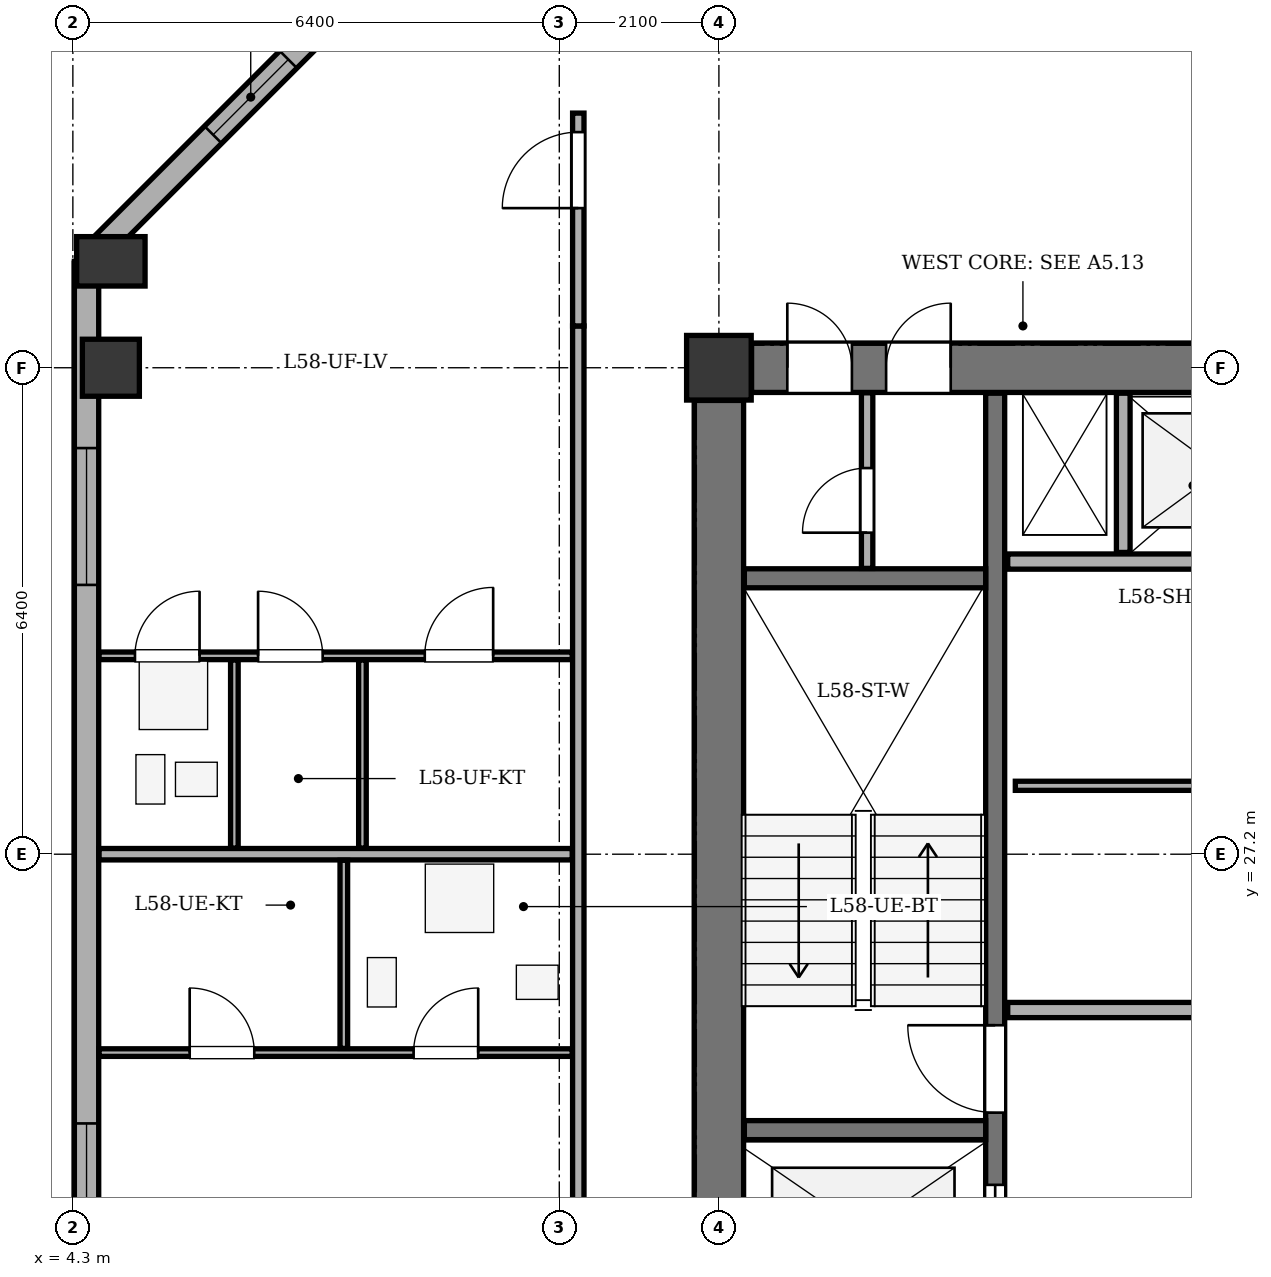
"""IFC4 building model, lengths in metres.
Left out: names, types, materials, properties, quantities, classifications, styles, units other than length and angle.
Written with IfcOpenShell. Run it as: python <this file> out.ifc"""

import sys

from ifc_helpers import new_model, si_unit, direction, frame, frame_2d, origin, origin_2d, place, context, subcontext, project, spatial, rectangle, extrude, element, fill, save


model = new_model("IFC4")
c1 = context("Model", 3, precision=1e-05, world=origin(), true_north=direction((0.0, 1.0)))
c2 = subcontext(c1, "Body", "Model", "MODEL_VIEW")
j1 = project(units=[si_unit("LENGTHUNIT", "METRE"), si_unit("PLANEANGLEUNIT", "RADIAN")], contexts=[c1])
p1 = place(None, origin())
s1 = spatial("IfcSite", under=j1, at=p1, CompositionType="ELEMENT")
p2 = place(p1, origin())
s2 = spatial("IfcBuilding", under=s1, at=p2, CompositionType="ELEMENT")
p3 = place(p2, frame((0.0, 0.0, 224.5)))
s3 = spatial("IfcBuildingStorey", under=s2, at=p3, CompositionType="ELEMENT", Elevation=224.5)
p4 = place(p3, frame((12.8, 33.6, 0.0), z_axis=(0.0, 0.0, 1.0), x_axis=(1.0, 0.0, 0.0)))
e1 = element("IfcColumn", 1, at=p4, inside=s3, PredefinedType="COLUMN", context=c2, shape_type="SweptSolid", body=[
    extrude(rectangle(XDim=0.85, YDim=0.85, at=origin_2d()), origin(), (0.0, 0.0, 1.0), 3.4),
])
p5 = place(p3, frame((4.8, 33.6, 0.0), z_axis=(0.0, 0.0, 1.0), x_axis=(1.0, 0.0, 0.0)))
e2 = element("IfcColumn", 2, at=p5, inside=s3, PredefinedType="COLUMN", context=c2, shape_type="SweptSolid", body=[
    extrude(rectangle(XDim=0.75, YDim=0.75, at=origin_2d()), origin(), (0.0, 0.0, 1.0), 3.4),
])
p6 = place(p3, frame((4.8, 35.0, 0.0), z_axis=(0.0, 0.0, 1.0), x_axis=(1.0, 0.0, 0.0)))
e3 = element("IfcColumn", 3, at=p6, inside=s3, PredefinedType="COLUMN", context=c2, shape_type="SweptSolid", body=[
    extrude(rectangle(XDim=0.65, YDim=0.9, at=origin_2d()), origin(), (0.0, 0.0, 1.0), 3.4),
])
p7 = place(p3, frame((4.48, 7.2, 0.0), z_axis=(0.0, 0.0, 1.0), x_axis=(0.0, 1.0, 0.0)))
e4 = element("IfcWall", 4, at=p7, inside=s3, PredefinedType="STANDARD", context=c2, shape_type="SweptSolid", body=[
    extrude(rectangle(XDim=27.8, YDim=0.32, at=frame_2d((13.9, 0.0))), origin(), (0.0, 0.0, 1.0), 2.335),
])
p8 = place(p7, frame((1.272, 0.0, 0.75)))
e5 = element("IfcOpeningElement", 5, at=p8, cuts=e4, PredefinedType="OPENING", context=c2, shape_type="SweptSolid", body=[
    extrude(rectangle(XDim=1.8, YDim=1.465, at=frame_2d((0.9, 0.732))), frame((0.0, 0.17, 0.0), z_axis=(0.0, -1.0, 0.0), x_axis=(1.0, 0.0, 0.0)), (0.0, 0.0, 1.0), 0.34),
])
p9 = place(p7, frame((3.806, 0.0, 0.75)))
e6 = element("IfcOpeningElement", 6, at=p9, cuts=e4, PredefinedType="OPENING", context=c2, shape_type="SweptSolid", body=[
    extrude(rectangle(XDim=1.8, YDim=1.465, at=frame_2d((0.9, 0.732))), frame((0.0, 0.17, 0.0), z_axis=(0.0, -1.0, 0.0), x_axis=(1.0, 0.0, 0.0)), (0.0, 0.0, 1.0), 0.34),
])
p10 = place(p7, frame((7.711, 0.0, 0.75)))
e7 = element("IfcOpeningElement", 7, at=p10, cuts=e4, PredefinedType="OPENING", context=c2, shape_type="SweptSolid", body=[
    extrude(rectangle(XDim=1.8, YDim=1.465, at=frame_2d((0.9, 0.732))), frame((0.0, 0.17, 0.0), z_axis=(0.0, -1.0, 0.0), x_axis=(1.0, 0.0, 0.0)), (0.0, 0.0, 1.0), 0.34),
])
p11 = place(p7, frame((10.542, 0.0, 0.75)))
e8 = element("IfcOpeningElement", 8, at=p11, cuts=e4, PredefinedType="OPENING", context=c2, shape_type="SweptSolid", body=[
    extrude(rectangle(XDim=1.8, YDim=1.465, at=frame_2d((0.9, 0.732))), frame((0.0, 0.17, 0.0), z_axis=(0.0, -1.0, 0.0), x_axis=(1.0, 0.0, 0.0)), (0.0, 0.0, 1.0), 0.34),
])
p12 = place(p7, frame((14.658, 0.0, 0.75)))
e9 = element("IfcOpeningElement", 9, at=p12, cuts=e4, PredefinedType="OPENING", context=c2, shape_type="SweptSolid", body=[
    extrude(rectangle(XDim=1.8, YDim=1.465, at=frame_2d((0.9, 0.732))), frame((0.0, 0.17, 0.0), z_axis=(0.0, -1.0, 0.0), x_axis=(1.0, 0.0, 0.0)), (0.0, 0.0, 1.0), 0.34),
])
p13 = place(p7, frame((23.543, 0.0, 0.75)))
e10 = element("IfcOpeningElement", 10, at=p13, cuts=e4, PredefinedType="OPENING", context=c2, shape_type="SweptSolid", body=[
    extrude(rectangle(XDim=1.8, YDim=1.465, at=frame_2d((0.9, 0.732))), frame((0.0, 0.17, 0.0), z_axis=(0.0, -1.0, 0.0), x_axis=(1.0, 0.0, 0.0)), (0.0, 0.0, 1.0), 0.34),
])
p14 = place(p3, frame((4.48, 35.0, 0.0), z_axis=(0.0, 0.0, 1.0), x_axis=(0.707106781187, 0.707106781187, 0.0)))
e11 = element("IfcWall", 11, at=p14, inside=s3, PredefinedType="STANDARD", context=c2, shape_type="SweptSolid", body=[
    extrude(rectangle(XDim=6.11, YDim=0.32, at=frame_2d((3.055, 0.0))), origin(), (0.0, 0.0, 1.0), 2.335),
])
p15 = place(p14, frame((2.355, 0.0, 0.75)))
e12 = element("IfcOpeningElement", 12, at=p15, cuts=e11, PredefinedType="OPENING", context=c2, shape_type="SweptSolid", body=[
    extrude(rectangle(XDim=1.4, YDim=1.465, at=frame_2d((0.7, 0.732))), frame((0.0, 0.17, 0.0), z_axis=(0.0, -1.0, 0.0), x_axis=(1.0, 0.0, 0.0)), (0.0, 0.0, 1.0), 0.34),
])
p16 = place(p3, frame((12.8, 21.23, 0.0), z_axis=(0.0, 0.0, 1.0), x_axis=(0.0, 1.0, 0.0)))
e13 = element("IfcWall", 13, at=p16, inside=s3, PredefinedType="SHEAR", context=c2, shape_type="SweptSolid", body=[
    extrude(rectangle(XDim=11.94, YDim=0.65, at=frame_2d((5.97, 0.0))), origin(), (0.0, 0.0, 1.0), 2.95),
])
p17 = place(p3, frame((13.23, 33.6, 0.0), z_axis=(0.0, 0.0, 1.0), x_axis=(1.0, 0.0, 0.0)))
e14 = element("IfcWall", 14, at=p17, inside=s3, PredefinedType="SHEAR", context=c2, shape_type="SweptSolid", body=[
    extrude(rectangle(XDim=7.14, YDim=0.65, at=frame_2d((3.57, 0.0))), origin(), (0.0, 0.0, 1.0), 2.95),
])
p18 = place(p17, frame((0.47, 0.0, 0.0)))
e15 = element("IfcOpeningElement", 15, at=p18, cuts=e14, PredefinedType="OPENING", context=c2, shape_type="SweptSolid", body=[
    extrude(rectangle(XDim=0.85, YDim=2.02, at=frame_2d((0.425, 1.01))), frame((0.0, 0.335, 0.0), z_axis=(0.0, -1.0, 0.0), x_axis=(1.0, 0.0, 0.0)), (0.0, 0.0, 1.0), 0.67),
])
p19 = place(p17, frame((1.77, 0.0, 0.0)))
e16 = element("IfcOpeningElement", 16, at=p19, cuts=e14, PredefinedType="OPENING", context=c2, shape_type="SweptSolid", body=[
    extrude(rectangle(XDim=0.85, YDim=2.02, at=frame_2d((0.425, 1.01))), frame((0.0, 0.335, 0.0), z_axis=(0.0, -1.0, 0.0), x_axis=(1.0, 0.0, 0.0)), (0.0, 0.0, 1.0), 0.67),
])
p20 = place(p3, frame((16.435, 21.135, 0.0), z_axis=(0.0, 0.0, 1.0), x_axis=(0.0, 1.0, 0.0)))
e17 = element("IfcWall", 17, at=p20, inside=s3, PredefinedType="SHEAR", context=c2, shape_type="SweptSolid", body=[
    extrude(rectangle(XDim=12.13, YDim=0.25, at=frame_2d((6.065, 0.0))), origin(), (0.0, 0.0, 1.0), 2.95),
])
p21 = place(p20, frame((0.515, 0.0, 0.0)))
e18 = element("IfcOpeningElement", 18, at=p21, cuts=e17, PredefinedType="OPENING", context=c2, shape_type="SweptSolid", body=[
    extrude(rectangle(XDim=1.2, YDim=2.15, at=frame_2d((0.6, 1.075))), frame((0.0, 0.135, 0.0), z_axis=(0.0, -1.0, 0.0), x_axis=(1.0, 0.0, 0.0)), (0.0, 0.0, 1.0), 0.27),
])
p22 = place(p20, frame((2.665, 0.0, 0.0)))
e19 = element("IfcOpeningElement", 19, at=p22, cuts=e17, PredefinedType="OPENING", context=c2, shape_type="SweptSolid", body=[
    extrude(rectangle(XDim=1.15, YDim=2.15, at=frame_2d((0.575, 1.075))), frame((0.0, 0.135, 0.0), z_axis=(0.0, -1.0, 0.0), x_axis=(1.0, 0.0, 0.0)), (0.0, 0.0, 1.0), 0.27),
])
for number, where, z_axis, x_axis in (
    (20, (13.135, 23.57, 0.0), (0.0, 0.0, 1.0), (1.0, 0.0, 0.0)),
    (21, (13.135, 30.83, 0.0), (0.0, 0.0, 1.0), (1.0, 0.0, 0.0)),
):
    element("IfcWall", number, at=place(p3, frame(where, z_axis=z_axis, x_axis=x_axis)), inside=s3, PredefinedType="SHEAR", context=c2, shape_type="SweptSolid", body=[
        extrude(rectangle(XDim=3.175, YDim=0.25, at=frame_2d((1.587, 0.0))), origin(), (0.0, 0.0, 1.0), 2.95),
    ])
for number, where, z_axis, x_axis in (
    (22, (16.6, 25.15, 0.0), (0.0, 0.0, 1.0), (1.0, 0.0, 0.0)),
    (23, (16.6, 31.05, 0.0), (0.0, 0.0, 1.0), (1.0, 0.0, 0.0)),
):
    element("IfcWall", number, at=place(p3, frame(where, z_axis=z_axis, x_axis=x_axis)), inside=s3, PredefinedType="SOLIDWALL", context=c2, shape_type="SweptSolid", body=[
        extrude(rectangle(XDim=3.85, YDim=0.2, at=frame_2d((1.925, 0.0))), origin(), (0.0, 0.0, 1.0), 2.95),
    ])
p23 = place(p3, frame((18.12, 31.17, 0.0), z_axis=(0.0, 0.0, 1.0), x_axis=(0.0, 1.0, 0.0)))
e24 = element("IfcWall", 24, at=p23, inside=s3, PredefinedType="PARTITIONING", context=c2, shape_type="SweptSolid", body=[
    extrude(rectangle(XDim=2.095, YDim=0.18, at=frame_2d((1.047, 0.0))), origin(), (0.0, 0.0, 1.0), 2.95),
])
p24 = place(p3, frame((14.75, 30.96, 0.0), z_axis=(0.0, 0.0, 1.0), x_axis=(0.0, 1.0, 0.0)))
e25 = element("IfcWall", 25, at=p24, inside=s3, PredefinedType="PARTITIONING", context=c2, shape_type="SweptSolid", body=[
    extrude(rectangle(XDim=2.31, YDim=0.15, at=frame_2d((1.155, 0.0))), origin(), (0.0, 0.0, 1.0), 2.95),
])
p25 = place(p24, frame((0.47, 0.0, 0.0)))
e26 = element("IfcOpeningElement", 26, at=p25, cuts=e25, PredefinedType="OPENING", context=c2, shape_type="SweptSolid", body=[
    extrude(rectangle(XDim=0.85, YDim=2.02, at=frame_2d((0.425, 1.01))), frame((0.0, 0.085, 0.0), z_axis=(0.0, -1.0, 0.0), x_axis=(1.0, 0.0, 0.0)), (0.0, 0.0, 1.0), 0.17),
])
p26 = place(p3, frame((16.7, 28.1, 0.0), z_axis=(0.0, 0.0, 1.0), x_axis=(1.0, 0.0, 0.0)))
e27 = element("IfcWall", 27, at=p26, inside=s3, PredefinedType="PARTITIONING", context=c2, shape_type="SweptSolid", body=[
    extrude(rectangle(XDim=9.85, YDim=0.12, at=frame_2d((4.925, 0.0))), origin(), (0.0, 0.0, 1.0), 2.95),
])
p27 = place(p3, frame((10.95, 20.25, 0.0), z_axis=(0.0, 0.0, 1.0), x_axis=(0.0, 1.0, 0.0)))
e28 = element("IfcWall", 28, at=p27, inside=s3, PredefinedType="PARTITIONING", context=c2, shape_type="SweptSolid", body=[
    extrude(rectangle(XDim=13.9, YDim=0.15, at=frame_2d((6.95, 0.0))), origin(), (0.0, 0.0, 1.0), 2.335),
])
p28 = place(p3, frame((10.95, 34.15, 0.0), z_axis=(0.0, 0.0, 1.0), x_axis=(0.0, 1.0, 0.0)))
e29 = element("IfcWall", 29, at=p28, inside=s3, PredefinedType="PARTITIONING", context=c2, shape_type="SweptSolid", body=[
    extrude(rectangle(XDim=2.8, YDim=0.15, at=frame_2d((1.4, 0.0))), origin(), (0.0, 0.0, 1.0), 2.335),
])
p29 = place(p28, frame((1.55, 0.0, 0.0)))
e30 = element("IfcOpeningElement", 30, at=p29, cuts=e29, PredefinedType="OPENING", context=c2, shape_type="SweptSolid", body=[
    extrude(rectangle(XDim=1.0, YDim=2.1, at=frame_2d((0.5, 1.05))), frame((0.0, 0.085, 0.0), z_axis=(0.0, -1.0, 0.0), x_axis=(1.0, 0.0, 0.0)), (0.0, 0.0, 1.0), 0.17),
])
p30 = place(p3, frame((4.645, 27.2, 0.0), z_axis=(0.0, 0.0, 1.0), x_axis=(1.0, 0.0, 0.0)))
e31 = element("IfcWall", 31, at=p30, inside=s3, PredefinedType="PARTITIONING", context=c2, shape_type="SweptSolid", body=[
    extrude(rectangle(XDim=6.225, YDim=0.15, at=frame_2d((3.113, 0.0))), origin(), (0.0, 0.0, 1.0), 2.95),
])
p31 = place(p3, frame((4.645, 24.59, 0.0), z_axis=(0.0, 0.0, 1.0), x_axis=(1.0, 0.0, 0.0)))
e32 = element("IfcWall", 32, at=p31, inside=s3, PredefinedType="PARTITIONING", context=c2, shape_type="SweptSolid", body=[
    extrude(rectangle(XDim=6.225, YDim=0.1, at=frame_2d((3.113, 0.0))), origin(), (0.0, 0.0, 1.0), 2.95),
])
p32 = place(p31, frame((1.192, 0.0, 0.0)))
e33 = element("IfcOpeningElement", 33, at=p32, cuts=e32, PredefinedType="OPENING", context=c2, shape_type="SweptSolid", body=[
    extrude(rectangle(XDim=0.85, YDim=2.05, at=frame_2d((0.425, 1.025))), frame((0.0, 0.06, 0.0), z_axis=(0.0, -1.0, 0.0), x_axis=(1.0, 0.0, 0.0)), (0.0, 0.0, 1.0), 0.12),
])
p33 = place(p31, frame((4.138, 0.0, 0.0)))
e34 = element("IfcOpeningElement", 34, at=p33, cuts=e32, PredefinedType="OPENING", context=c2, shape_type="SweptSolid", body=[
    extrude(rectangle(XDim=0.85, YDim=2.05, at=frame_2d((0.425, 1.025))), frame((0.0, 0.06, 0.0), z_axis=(0.0, -1.0, 0.0), x_axis=(1.0, 0.0, 0.0)), (0.0, 0.0, 1.0), 0.12),
])
p34 = place(p3, frame((7.865, 24.645, 0.0), z_axis=(0.0, 0.0, 1.0), x_axis=(0.0, 1.0, 0.0)))
e35 = element("IfcWall", 35, at=p34, inside=s3, PredefinedType="PARTITIONING", context=c2, shape_type="SweptSolid", body=[
    extrude(rectangle(XDim=2.475, YDim=0.1, at=frame_2d((1.238, 0.0))), origin(), (0.0, 0.0, 1.0), 2.95),
])
p35 = place(p3, frame((4.645, 29.81, 0.0), z_axis=(0.0, 0.0, 1.0), x_axis=(1.0, 0.0, 0.0)))
e36 = element("IfcWall", 36, at=p35, inside=s3, PredefinedType="PARTITIONING", context=c2, shape_type="SweptSolid", body=[
    extrude(rectangle(XDim=6.225, YDim=0.1, at=frame_2d((3.113, 0.0))), origin(), (0.0, 0.0, 1.0), 2.95),
])
p36 = place(p35, frame((0.472, 0.0, 0.0)))
e37 = element("IfcOpeningElement", 37, at=p36, cuts=e36, PredefinedType="OPENING", context=c2, shape_type="SweptSolid", body=[
    extrude(rectangle(XDim=0.85, YDim=2.05, at=frame_2d((0.425, 1.025))), frame((0.0, 0.06, 0.0), z_axis=(0.0, -1.0, 0.0), x_axis=(1.0, 0.0, 0.0)), (0.0, 0.0, 1.0), 0.12),
])
p37 = place(p35, frame((2.092, 0.0, 0.0)))
e38 = element("IfcOpeningElement", 38, at=p37, cuts=e36, PredefinedType="OPENING", context=c2, shape_type="SweptSolid", body=[
    extrude(rectangle(XDim=0.85, YDim=2.05, at=frame_2d((0.425, 1.025))), frame((0.0, 0.06, 0.0), z_axis=(0.0, -1.0, 0.0), x_axis=(1.0, 0.0, 0.0)), (0.0, 0.0, 1.0), 0.12),
])
p38 = place(p35, frame((4.285, 0.0, 0.0)))
e39 = element("IfcOpeningElement", 39, at=p38, cuts=e36, PredefinedType="OPENING", context=c2, shape_type="SweptSolid", body=[
    extrude(rectangle(XDim=0.9, YDim=2.05, at=frame_2d((0.45, 1.025))), frame((0.0, 0.06, 0.0), z_axis=(0.0, -1.0, 0.0), x_axis=(1.0, 0.0, 0.0)), (0.0, 0.0, 1.0), 0.12),
])
for number, where, z_axis, x_axis in (
    (40, (6.425, 27.28, 0.0), (0.0, 0.0, 1.0), (0.0, 1.0, 0.0)),
    (41, (8.11, 27.28, 0.0), (0.0, 0.0, 1.0), (0.0, 1.0, 0.0)),
):
    element("IfcWall", number, at=place(p3, frame(where, z_axis=z_axis, x_axis=x_axis)), inside=s3, PredefinedType="PARTITIONING", context=c2, shape_type="SweptSolid", body=[
        extrude(rectangle(XDim=2.475, YDim=0.1, at=frame_2d((1.237, 0.0))), origin(), (0.0, 0.0, 1.0), 2.95),
    ])
p39 = place(p12, origin())
e42 = element("IfcWindow", 42, at=p39, inside=s3, PartitioningType="SINGLE_PANEL", PredefinedType="WINDOW", context=c2, shape_type="SweptSolid", body=[
    extrude(rectangle(XDim=1.8, YDim=1.465, at=frame_2d((0.9, 0.732))), frame((0.0, -0.01, 0.0), z_axis=(0.0, -1.0, 0.0), x_axis=(1.0, 0.0, 0.0)), (0.0, 0.0, 1.0), 0.06),
])
fill(e9, e42)
p40 = place(p13, origin())
e43 = element("IfcWindow", 43, at=p40, inside=s3, PartitioningType="SINGLE_PANEL", PredefinedType="WINDOW", context=c2, shape_type="SweptSolid", body=[
    extrude(rectangle(XDim=1.8, YDim=1.465, at=frame_2d((0.9, 0.732))), frame((0.0, -0.01, 0.0), z_axis=(0.0, -1.0, 0.0), x_axis=(1.0, 0.0, 0.0)), (0.0, 0.0, 1.0), 0.06),
])
fill(e10, e43)
p41 = place(p15, origin())
e44 = element("IfcWindow", 44, at=p41, inside=s3, PartitioningType="SINGLE_PANEL", PredefinedType="WINDOW", context=c2, shape_type="SweptSolid", body=[
    extrude(rectangle(XDim=1.4, YDim=1.465, at=frame_2d((0.7, 0.732))), frame((0.0, -0.01, 0.0), z_axis=(0.0, -1.0, 0.0), x_axis=(1.0, 0.0, 0.0)), (0.0, 0.0, 1.0), 0.06),
])
fill(e12, e44)
p42 = place(p18, origin())
e45 = element("IfcDoor", 45, at=p42, inside=s3, OperationType="SINGLE_SWING_LEFT", PredefinedType="DOOR", context=c2, shape_type="SweptSolid", body=[
    extrude(rectangle(XDim=0.85, YDim=2.02, at=frame_2d((0.425, 1.01))), frame((0.0, 0.025, 0.0), z_axis=(0.0, -1.0, 0.0), x_axis=(1.0, 0.0, 0.0)), (0.0, 0.0, 1.0), 0.05),
])
fill(e15, e45)
p43 = place(p19, origin())
e46 = element("IfcDoor", 46, at=p43, inside=s3, OperationType="SINGLE_SWING_RIGHT", PredefinedType="DOOR", context=c2, shape_type="SweptSolid", body=[
    extrude(rectangle(XDim=0.85, YDim=2.02, at=frame_2d((0.425, 1.01))), frame((0.0, 0.025, 0.0), z_axis=(0.0, -1.0, 0.0), x_axis=(1.0, 0.0, 0.0)), (0.0, 0.0, 1.0), 0.05),
])
fill(e16, e46)
p44 = place(p21, origin())
e47 = element("IfcDoor", 47, at=p44, inside=s3, OperationType="DOUBLE_DOOR_SLIDING", PredefinedType="DOOR", context=c2, shape_type="SweptSolid", body=[
    extrude(rectangle(XDim=1.2, YDim=2.15, at=frame_2d((0.6, 1.075))), frame((0.0, 0.025, 0.0), z_axis=(0.0, -1.0, 0.0), x_axis=(1.0, 0.0, 0.0)), (0.0, 0.0, 1.0), 0.05),
])
fill(e18, e47)
p45 = place(p22, origin())
e48 = element("IfcDoor", 48, at=p45, inside=s3, OperationType="SINGLE_SWING_RIGHT", PredefinedType="DOOR", context=c2, shape_type="SweptSolid", body=[
    extrude(rectangle(XDim=1.15, YDim=2.15, at=frame_2d((0.575, 1.075))), frame((0.0, 0.025, 0.0), z_axis=(0.0, -1.0, 0.0), x_axis=(1.0, 0.0, 0.0)), (0.0, 0.0, 1.0), 0.05),
])
fill(e19, e48)
p46 = place(p25, origin())
e49 = element("IfcDoor", 49, at=p46, inside=s3, OperationType="SINGLE_SWING_LEFT", PredefinedType="DOOR", context=c2, shape_type="SweptSolid", body=[
    extrude(rectangle(XDim=0.85, YDim=2.02, at=frame_2d((0.425, 1.01))), frame((0.0, 0.025, 0.0), z_axis=(0.0, -1.0, 0.0), x_axis=(1.0, 0.0, 0.0)), (0.0, 0.0, 1.0), 0.05),
])
fill(e26, e49)
p47 = place(p32, origin())
e50 = element("IfcDoor", 50, at=p47, inside=s3, OperationType="SINGLE_SWING_LEFT", PredefinedType="DOOR", context=c2, shape_type="SweptSolid", body=[
    extrude(rectangle(XDim=0.85, YDim=2.05, at=frame_2d((0.425, 1.025))), frame((0.0, 0.025, 0.0), z_axis=(0.0, -1.0, 0.0), x_axis=(1.0, 0.0, 0.0)), (0.0, 0.0, 1.0), 0.05),
])
fill(e33, e50)
p48 = place(p33, origin())
e51 = element("IfcDoor", 51, at=p48, inside=s3, OperationType="SINGLE_SWING_RIGHT", PredefinedType="DOOR", context=c2, shape_type="SweptSolid", body=[
    extrude(rectangle(XDim=0.85, YDim=2.05, at=frame_2d((0.425, 1.025))), frame((0.0, 0.025, 0.0), z_axis=(0.0, -1.0, 0.0), x_axis=(1.0, 0.0, 0.0)), (0.0, 0.0, 1.0), 0.05),
])
fill(e34, e51)
p49 = place(p29, origin())
e52 = element("IfcDoor", 52, at=p49, inside=s3, OperationType="SINGLE_SWING_LEFT", PredefinedType="DOOR", context=c2, shape_type="SweptSolid", body=[
    extrude(rectangle(XDim=1.0, YDim=2.1, at=frame_2d((0.5, 1.05))), frame((0.0, 0.025, 0.0), z_axis=(0.0, -1.0, 0.0), x_axis=(1.0, 0.0, 0.0)), (0.0, 0.0, 1.0), 0.05),
])
fill(e30, e52)
p50 = place(p36, origin())
e53 = element("IfcDoor", 53, at=p50, inside=s3, OperationType="SINGLE_SWING_RIGHT", PredefinedType="DOOR", context=c2, shape_type="SweptSolid", body=[
    extrude(rectangle(XDim=0.85, YDim=2.05, at=frame_2d((0.425, 1.025))), frame((0.0, 0.025, 0.0), z_axis=(0.0, -1.0, 0.0), x_axis=(1.0, 0.0, 0.0)), (0.0, 0.0, 1.0), 0.05),
])
fill(e37, e53)
p51 = place(p37, origin())
e54 = element("IfcDoor", 54, at=p51, inside=s3, OperationType="SINGLE_SWING_LEFT", PredefinedType="DOOR", context=c2, shape_type="SweptSolid", body=[
    extrude(rectangle(XDim=0.85, YDim=2.05, at=frame_2d((0.425, 1.025))), frame((0.0, 0.025, 0.0), z_axis=(0.0, -1.0, 0.0), x_axis=(1.0, 0.0, 0.0)), (0.0, 0.0, 1.0), 0.05),
])
fill(e38, e54)
p52 = place(p38, origin())
e55 = element("IfcDoor", 55, at=p52, inside=s3, OperationType="SINGLE_SWING_RIGHT", PredefinedType="DOOR", context=c2, shape_type="SweptSolid", body=[
    extrude(rectangle(XDim=0.9, YDim=2.05, at=frame_2d((0.45, 1.025))), frame((0.0, 0.025, 0.0), z_axis=(0.0, -1.0, 0.0), x_axis=(1.0, 0.0, 0.0)), (0.0, 0.0, 1.0), 0.05),
])
fill(e39, e55)
save(model, sys.argv[1])
